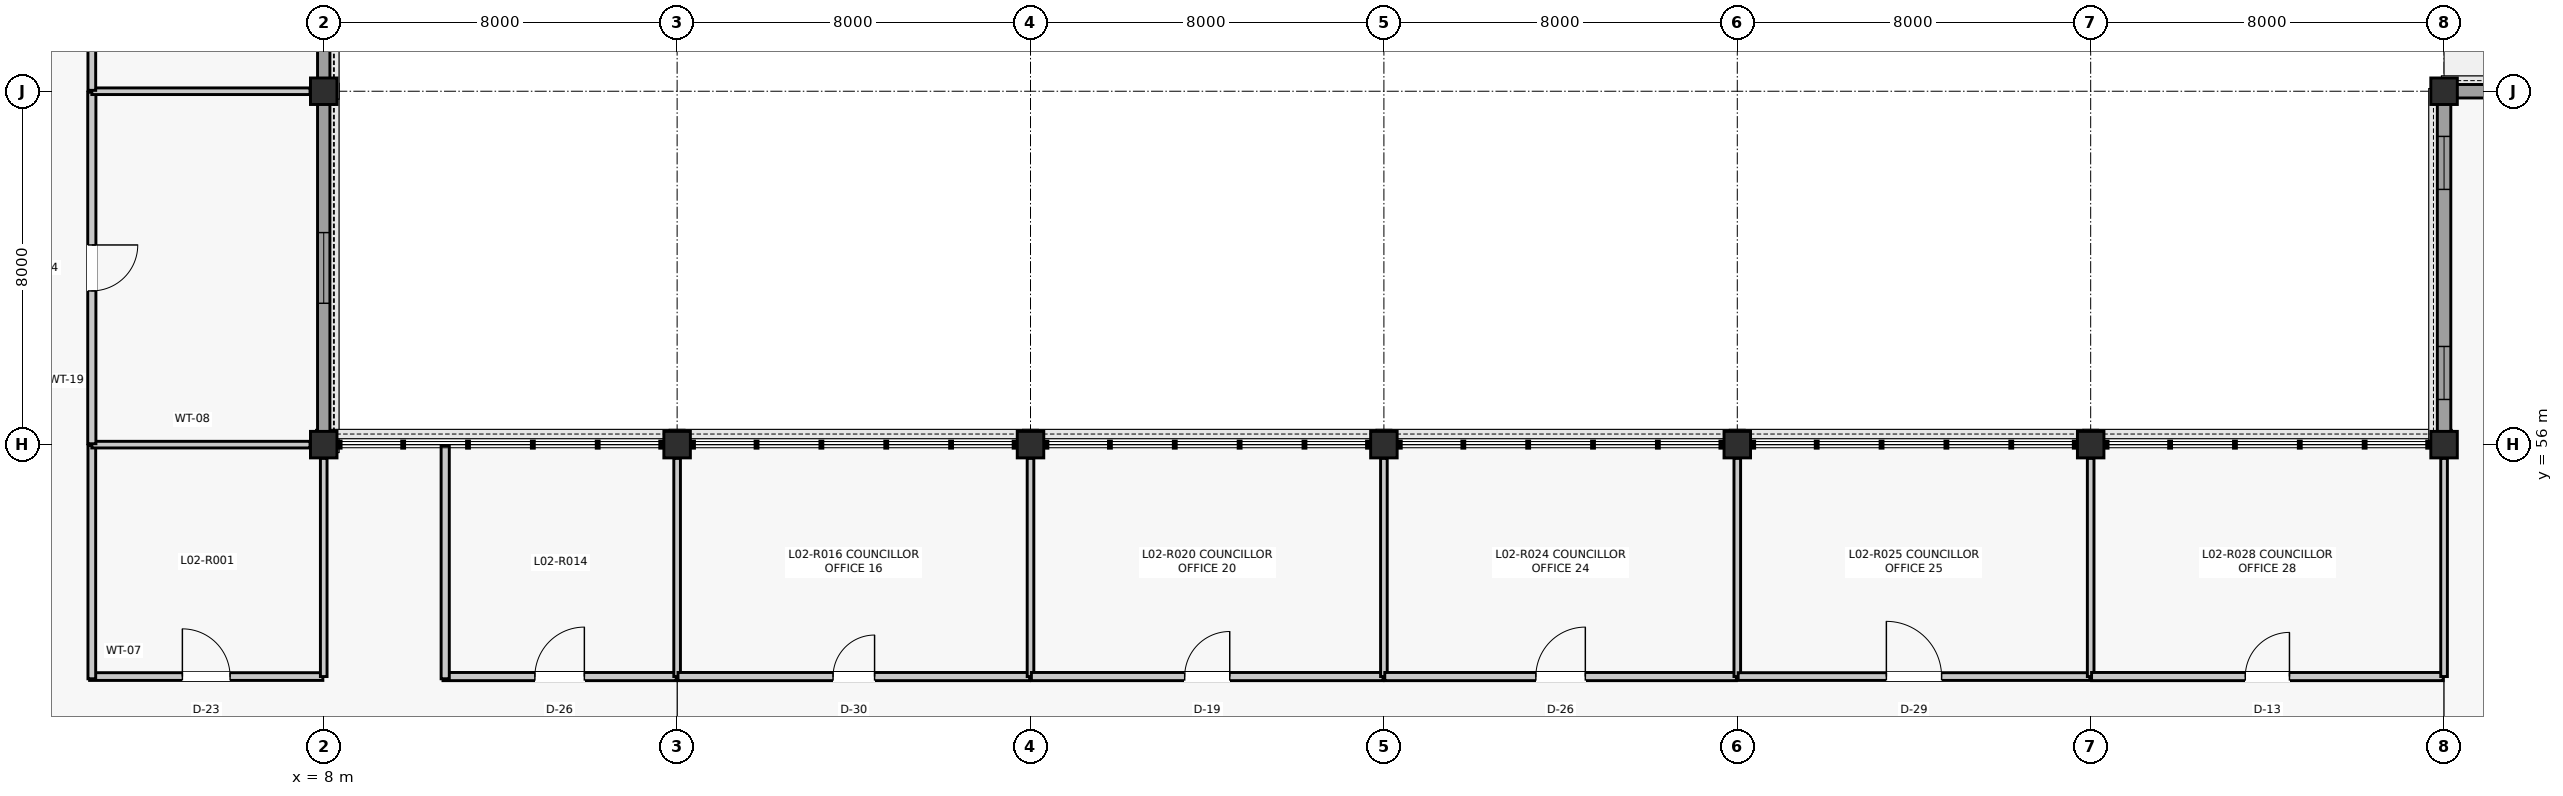
"""IFC4 building model, lengths in metres.
Left out: names, types, materials, properties, quantities, classifications, styles, units other than length and angle.
Written with IfcOpenShell. Run it as: python <this file> out.ifc"""

import sys

from ifc_helpers import new_model, si_unit, direction, frame, frame_2d, origin, origin_2d, place, context, subcontext, project, spatial, rectangle, extrude, element, fill, save


model = new_model("IFC4")
c1 = context("Model", 3, precision=1e-05, world=origin(), true_north=direction((0.0, 1.0)))
c2 = subcontext(c1, "Body", "Model", "MODEL_VIEW")
j1 = project(units=[si_unit("LENGTHUNIT", "METRE"), si_unit("PLANEANGLEUNIT", "RADIAN")], contexts=[c1])
p1 = place(None, origin())
s1 = spatial("IfcSite", under=j1, at=p1, CompositionType="ELEMENT")
p2 = place(p1, origin())
s2 = spatial("IfcBuilding", under=s1, at=p2, CompositionType="ELEMENT")
p3 = place(p2, frame((0.0, 0.0, 9.9)))
s3 = spatial("IfcBuildingStorey", under=s2, at=p3, CompositionType="ELEMENT", Elevation=9.9)
for number, where, z_axis, x_axis in (
    (1, (8.0, 56.0, 0.0), (0.0, 0.0, 1.0), (1.0, 0.0, 0.0)),
    (2, (8.0, 64.0, 0.0), (0.0, 0.0, 1.0), (1.0, 0.0, 0.0)),
    (3, (16.0, 56.0, 0.0), (0.0, 0.0, 1.0), (1.0, 0.0, 0.0)),
    (4, (24.0, 56.0, 0.0), (0.0, 0.0, 1.0), (1.0, 0.0, 0.0)),
    (5, (32.0, 56.0, 0.0), (0.0, 0.0, 1.0), (1.0, 0.0, 0.0)),
    (6, (40.0, 56.0, 0.0), (0.0, 0.0, 1.0), (1.0, 0.0, 0.0)),
    (7, (48.0, 56.0, 0.0), (0.0, 0.0, 1.0), (1.0, 0.0, 0.0)),
    (8, (56.0, 56.0, 0.0), (0.0, 0.0, 1.0), (1.0, 0.0, 0.0)),
    (9, (56.0, 64.0, 0.0), (0.0, 0.0, 1.0), (1.0, 0.0, 0.0)),
):
    element("IfcColumn", number, at=place(p3, frame(where, z_axis=z_axis, x_axis=x_axis)), inside=s3, PredefinedType="COLUMN", context=c2, shape_type="SweptSolid", body=[
        extrude(rectangle(XDim=0.6, YDim=0.6, at=origin_2d()), origin(), (0.0, 0.0, 1.0), 3.96),
    ])
p4 = place(p3, frame((8.0, 56.285, 0.0), z_axis=(0.0, 0.0, 1.0), x_axis=(0.0, 1.0, 0.0)))
e10 = element("IfcWall", 10, at=p4, inside=s3, PredefinedType="SOLIDWALL", context=c2, shape_type="SweptSolid", body=[
    extrude(rectangle(XDim=7.43, YDim=0.28, at=frame_2d((3.715, 0.0))), origin(), (0.0, 0.0, 1.0), 3.284),
])
p5 = place(p4, frame((2.915, 0.0, 0.9)))
e11 = element("IfcOpeningElement", 11, at=p5, cuts=e10, PredefinedType="OPENING", context=c2, shape_type="SweptSolid", body=[
    extrude(rectangle(XDim=1.6, YDim=2.0, at=frame_2d((0.8, 1.0))), frame((0.0, 0.15, 0.0), z_axis=(0.0, -1.0, 0.0), x_axis=(1.0, 0.0, 0.0)), (0.0, 0.0, 1.0), 0.3),
])
p6 = place(p3, frame((8.0, 64.285, 0.0), z_axis=(0.0, 0.0, 1.0), x_axis=(0.0, 1.0, 0.0)))
e12 = element("IfcWall", 12, at=p6, inside=s3, PredefinedType="SOLIDWALL", context=c2, shape_type="SweptSolid", body=[
    extrude(rectangle(XDim=7.43, YDim=0.28, at=frame_2d((3.715, 0.0))), origin(), (0.0, 0.0, 1.0), 3.347),
])
p7 = place(p6, frame((2.965, 0.0, 0.9)))
e13 = element("IfcOpeningElement", 13, at=p7, cuts=e12, PredefinedType="OPENING", context=c2, shape_type="SweptSolid", body=[
    extrude(rectangle(XDim=1.5, YDim=1.9, at=frame_2d((0.75, 0.95))), frame((0.0, 0.15, 0.0), z_axis=(0.0, -1.0, 0.0), x_axis=(1.0, 0.0, 0.0)), (0.0, 0.0, 1.0), 0.3),
])
p8 = place(p3, frame((56.285, 64.0, 0.0), z_axis=(0.0, 0.0, 1.0), x_axis=(1.0, 0.0, 0.0)))
e14 = element("IfcWall", 14, at=p8, inside=s3, PredefinedType="SOLIDWALL", context=c2, shape_type="SweptSolid", body=[
    extrude(rectangle(XDim=7.43, YDim=0.305, at=frame_2d((3.715, 0.0))), origin(), (0.0, 0.0, 1.0), 3.344),
])
p9 = place(p8, frame((0.737, 0.0, 0.95)))
e15 = element("IfcOpeningElement", 15, at=p9, cuts=e14, PredefinedType="OPENING", context=c2, shape_type="SweptSolid", body=[
    extrude(rectangle(XDim=1.2, YDim=1.8, at=frame_2d((0.6, 0.9))), frame((0.0, 0.162, 0.0), z_axis=(0.0, -1.0, 0.0), x_axis=(1.0, 0.0, 0.0)), (0.0, 0.0, 1.0), 0.325),
])
p10 = place(p8, frame((5.493, 0.0, 0.95)))
e16 = element("IfcOpeningElement", 16, at=p10, cuts=e14, PredefinedType="OPENING", context=c2, shape_type="SweptSolid", body=[
    extrude(rectangle(XDim=1.2, YDim=1.8, at=frame_2d((0.6, 0.9))), frame((0.0, 0.162, 0.0), z_axis=(0.0, -1.0, 0.0), x_axis=(1.0, 0.0, 0.0)), (0.0, 0.0, 1.0), 0.325),
])
p11 = place(p3, frame((56.0, 56.285, 0.0), z_axis=(0.0, 0.0, 1.0), x_axis=(0.0, 1.0, 0.0)))
e17 = element("IfcWall", 17, at=p11, inside=s3, PredefinedType="SOLIDWALL", context=c2, shape_type="SweptSolid", body=[
    extrude(rectangle(XDim=7.43, YDim=0.305, at=frame_2d((3.715, 0.0))), origin(), (0.0, 0.0, 1.0), 3.28),
])
p12 = place(p11, frame((0.737, 0.0, 0.95)))
e18 = element("IfcOpeningElement", 18, at=p12, cuts=e17, PredefinedType="OPENING", context=c2, shape_type="SweptSolid", body=[
    extrude(rectangle(XDim=1.2, YDim=1.8, at=frame_2d((0.6, 0.9))), frame((0.0, 0.162, 0.0), z_axis=(0.0, -1.0, 0.0), x_axis=(1.0, 0.0, 0.0)), (0.0, 0.0, 1.0), 0.325),
])
p13 = place(p11, frame((5.493, 0.0, 0.95)))
e19 = element("IfcOpeningElement", 19, at=p13, cuts=e17, PredefinedType="OPENING", context=c2, shape_type="SweptSolid", body=[
    extrude(rectangle(XDim=1.2, YDim=1.8, at=frame_2d((0.6, 0.9))), frame((0.0, 0.162, 0.0), z_axis=(0.0, -1.0, 0.0), x_axis=(1.0, 0.0, 0.0)), (0.0, 0.0, 1.0), 0.325),
])
p14 = place(p3, frame((2.7, 50.75, 0.0), z_axis=(0.0, 0.0, 1.0), x_axis=(1.0, 0.0, 0.0)))
e20 = element("IfcWall", 20, at=p14, inside=s3, PredefinedType="PARTITIONING", context=c2, shape_type="SweptSolid", body=[
    extrude(rectangle(XDim=5.28, YDim=0.175, at=frame_2d((2.64, 0.0))), origin(), (0.0, 0.0, 1.0), 3.221),
])
p15 = place(p14, frame((2.1, 0.0, 0.0)))
e21 = element("IfcOpeningElement", 21, at=p15, cuts=e20, PredefinedType="OPENING", context=c2, shape_type="SweptSolid", body=[
    extrude(rectangle(XDim=1.08, YDim=2.2, at=frame_2d((0.54, 1.1))), frame((0.0, 0.097, 0.0), z_axis=(0.0, -1.0, 0.0), x_axis=(1.0, 0.0, 0.0)), (0.0, 0.0, 1.0), 0.195),
])
p16 = place(p3, frame((2.75, 50.7, 0.0), z_axis=(0.0, 0.0, 1.0), x_axis=(0.0, 1.0, 0.0)))
e22 = element("IfcWall", 22, at=p16, inside=s3, PredefinedType="PARTITIONING", context=c2, shape_type="SweptSolid", body=[
    extrude(rectangle(XDim=5.28, YDim=0.175, at=frame_2d((2.64, 0.0))), origin(), (0.0, 0.0, 1.0), 3.151),
])
p17 = place(p3, frame((2.75, 56.0, 0.0), z_axis=(0.0, 0.0, 1.0), x_axis=(1.0, 0.0, 0.0)))
e23 = element("IfcWall", 23, at=p17, inside=s3, PredefinedType="PARTITIONING", context=c2, shape_type="SweptSolid", body=[
    extrude(rectangle(XDim=4.94, YDim=0.15, at=frame_2d((2.47, 0.0))), origin(), (0.0, 0.0, 1.0), 3.151),
])
p18 = place(p3, frame((8.0, 50.75, 0.0), z_axis=(0.0, 0.0, 1.0), x_axis=(0.0, 1.0, 0.0)))
e24 = element("IfcWall", 24, at=p18, inside=s3, PredefinedType="PARTITIONING", context=c2, shape_type="SweptSolid", body=[
    extrude(rectangle(XDim=4.94, YDim=0.15, at=frame_2d((2.47, 0.0))), origin(), (0.0, 0.0, 1.0), 3.221),
])
p19 = place(p3, frame((2.75, 56.02, 0.0), z_axis=(0.0, 0.0, 1.0), x_axis=(0.0, 1.0, 0.0)))
e25 = element("IfcWall", 25, at=p19, inside=s3, PredefinedType="PARTITIONING", context=c2, shape_type="SweptSolid", body=[
    extrude(rectangle(XDim=7.96, YDim=0.185, at=frame_2d((3.98, 0.0))), origin(), (0.0, 0.0, 1.0), 3.082),
])
p20 = place(p19, frame((3.46, 0.0, 0.0)))
e26 = element("IfcOpeningElement", 26, at=p20, cuts=e25, PredefinedType="OPENING", context=c2, shape_type="SweptSolid", body=[
    extrude(rectangle(XDim=1.04, YDim=2.18, at=frame_2d((0.52, 1.09))), frame((0.0, 0.103, 0.0), z_axis=(0.0, -1.0, 0.0), x_axis=(1.0, 0.0, 0.0)), (0.0, 0.0, 1.0), 0.205),
])
p21 = place(p3, frame((2.75, 64.0, 0.0), z_axis=(0.0, 0.0, 1.0), x_axis=(1.0, 0.0, 0.0)))
e27 = element("IfcWall", 27, at=p21, inside=s3, PredefinedType="PARTITIONING", context=c2, shape_type="SweptSolid", body=[
    extrude(rectangle(XDim=4.94, YDim=0.15, at=frame_2d((2.47, 0.0))), origin(), (0.0, 0.0, 1.0), 3.082),
])
p22 = place(p3, frame((2.75, 64.02, 0.0), z_axis=(0.0, 0.0, 1.0), x_axis=(0.0, 1.0, 0.0)))
e28 = element("IfcWall", 28, at=p22, inside=s3, PredefinedType="PARTITIONING", context=c2, shape_type="SweptSolid", body=[
    extrude(rectangle(XDim=7.96, YDim=0.175, at=frame_2d((3.98, 0.0))), origin(), (0.0, 0.0, 1.0), 3.082),
])
p23 = place(p22, frame((3.5, 0.0, 0.0)))
e29 = element("IfcOpeningElement", 29, at=p23, cuts=e28, PredefinedType="OPENING", context=c2, shape_type="SweptSolid", body=[
    extrude(rectangle(XDim=0.96, YDim=2.14, at=frame_2d((0.48, 1.07))), frame((0.0, 0.097, 0.0), z_axis=(0.0, -1.0, 0.0), x_axis=(1.0, 0.0, 0.0)), (0.0, 0.0, 1.0), 0.195),
])
p24 = place(p3, frame((10.7, 50.75, 0.0), z_axis=(0.0, 0.0, 1.0), x_axis=(1.0, 0.0, 0.0)))
e30 = element("IfcWall", 30, at=p24, inside=s3, PredefinedType="PARTITIONING", context=c2, shape_type="SweptSolid", body=[
    extrude(rectangle(XDim=5.28, YDim=0.185, at=frame_2d((2.64, 0.0))), origin(), (0.0, 0.0, 1.0), 3.157),
])
p25 = place(p24, frame((2.08, 0.0, 0.0)))
e31 = element("IfcOpeningElement", 31, at=p25, cuts=e30, PredefinedType="OPENING", context=c2, shape_type="SweptSolid", body=[
    extrude(rectangle(XDim=1.12, YDim=2.22, at=frame_2d((0.56, 1.11))), frame((0.0, 0.103, 0.0), z_axis=(0.0, -1.0, 0.0), x_axis=(1.0, 0.0, 0.0)), (0.0, 0.0, 1.0), 0.205),
])
p26 = place(p3, frame((10.75, 50.7, 0.0), z_axis=(0.0, 0.0, 1.0), x_axis=(0.0, 1.0, 0.0)))
e32 = element("IfcWall", 32, at=p26, inside=s3, PredefinedType="PARTITIONING", context=c2, shape_type="SweptSolid", body=[
    extrude(rectangle(XDim=5.28, YDim=0.185, at=frame_2d((2.64, 0.0))), origin(), (0.0, 0.0, 1.0), 3.277),
])
p27 = place(p3, frame((16.0, 50.75, 0.0), z_axis=(0.0, 0.0, 1.0), x_axis=(0.0, 1.0, 0.0)))
e33 = element("IfcWall", 33, at=p27, inside=s3, PredefinedType="PARTITIONING", context=c2, shape_type="SweptSolid", body=[
    extrude(rectangle(XDim=4.94, YDim=0.15, at=frame_2d((2.47, 0.0))), origin(), (0.0, 0.0, 1.0), 3.157),
])
p28 = place(p3, frame((16.02, 50.75, 0.0), z_axis=(0.0, 0.0, 1.0), x_axis=(1.0, 0.0, 0.0)))
e34 = element("IfcWall", 34, at=p28, inside=s3, PredefinedType="PARTITIONING", context=c2, shape_type="SweptSolid", body=[
    extrude(rectangle(XDim=7.96, YDim=0.185, at=frame_2d((3.98, 0.0))), origin(), (0.0, 0.0, 1.0), 3.157),
])
p29 = place(p28, frame((3.51, 0.0, 0.0)))
e35 = element("IfcOpeningElement", 35, at=p29, cuts=e34, PredefinedType="OPENING", context=c2, shape_type="SweptSolid", body=[
    extrude(rectangle(XDim=0.94, YDim=2.12, at=frame_2d((0.47, 1.06))), frame((0.0, 0.103, 0.0), z_axis=(0.0, -1.0, 0.0), x_axis=(1.0, 0.0, 0.0)), (0.0, 0.0, 1.0), 0.205),
])
p30 = place(p3, frame((24.0, 50.75, 0.0), z_axis=(0.0, 0.0, 1.0), x_axis=(0.0, 1.0, 0.0)))
e36 = element("IfcWall", 36, at=p30, inside=s3, PredefinedType="PARTITIONING", context=c2, shape_type="SweptSolid", body=[
    extrude(rectangle(XDim=4.94, YDim=0.15, at=frame_2d((2.47, 0.0))), origin(), (0.0, 0.0, 1.0), 3.227),
])
p31 = place(p3, frame((24.02, 50.75, 0.0), z_axis=(0.0, 0.0, 1.0), x_axis=(1.0, 0.0, 0.0)))
e37 = element("IfcWall", 37, at=p31, inside=s3, PredefinedType="PARTITIONING", context=c2, shape_type="SweptSolid", body=[
    extrude(rectangle(XDim=7.96, YDim=0.185, at=frame_2d((3.98, 0.0))), origin(), (0.0, 0.0, 1.0), 3.151),
])
p32 = place(p31, frame((3.47, 0.0, 0.0)))
e38 = element("IfcOpeningElement", 38, at=p32, cuts=e37, PredefinedType="OPENING", context=c2, shape_type="SweptSolid", body=[
    extrude(rectangle(XDim=1.02, YDim=2.2, at=frame_2d((0.51, 1.1))), frame((0.0, 0.103, 0.0), z_axis=(0.0, -1.0, 0.0), x_axis=(1.0, 0.0, 0.0)), (0.0, 0.0, 1.0), 0.205),
])
p33 = place(p3, frame((32.0, 50.75, 0.0), z_axis=(0.0, 0.0, 1.0), x_axis=(0.0, 1.0, 0.0)))
e39 = element("IfcWall", 39, at=p33, inside=s3, PredefinedType="PARTITIONING", context=c2, shape_type="SweptSolid", body=[
    extrude(rectangle(XDim=4.94, YDim=0.15, at=frame_2d((2.47, 0.0))), origin(), (0.0, 0.0, 1.0), 3.151),
])
p34 = place(p3, frame((32.02, 50.75, 0.0), z_axis=(0.0, 0.0, 1.0), x_axis=(1.0, 0.0, 0.0)))
e40 = element("IfcWall", 40, at=p34, inside=s3, PredefinedType="PARTITIONING", context=c2, shape_type="SweptSolid", body=[
    extrude(rectangle(XDim=7.96, YDim=0.185, at=frame_2d((3.98, 0.0))), origin(), (0.0, 0.0, 1.0), 3.151),
])
p35 = place(p34, frame((3.42, 0.0, 0.0)))
e41 = element("IfcOpeningElement", 41, at=p35, cuts=e40, PredefinedType="OPENING", context=c2, shape_type="SweptSolid", body=[
    extrude(rectangle(XDim=1.12, YDim=2.22, at=frame_2d((0.56, 1.11))), frame((0.0, 0.103, 0.0), z_axis=(0.0, -1.0, 0.0), x_axis=(1.0, 0.0, 0.0)), (0.0, 0.0, 1.0), 0.205),
])
p36 = place(p3, frame((40.0, 50.75, 0.0), z_axis=(0.0, 0.0, 1.0), x_axis=(0.0, 1.0, 0.0)))
e42 = element("IfcWall", 42, at=p36, inside=s3, PredefinedType="PARTITIONING", context=c2, shape_type="SweptSolid", body=[
    extrude(rectangle(XDim=4.94, YDim=0.15, at=frame_2d((2.47, 0.0))), origin(), (0.0, 0.0, 1.0), 3.221),
])
p37 = place(p3, frame((40.02, 50.75, 0.0), z_axis=(0.0, 0.0, 1.0), x_axis=(1.0, 0.0, 0.0)))
e43 = element("IfcWall", 43, at=p37, inside=s3, PredefinedType="PARTITIONING", context=c2, shape_type="SweptSolid", body=[
    extrude(rectangle(XDim=7.96, YDim=0.175, at=frame_2d((3.98, 0.0))), origin(), (0.0, 0.0, 1.0), 3.157),
])
p38 = place(p37, frame((3.355, 0.0, 0.0)))
e44 = element("IfcOpeningElement", 44, at=p38, cuts=e43, PredefinedType="OPENING", context=c2, shape_type="SweptSolid", body=[
    extrude(rectangle(XDim=1.25, YDim=2.18, at=frame_2d((0.625, 1.09))), frame((0.0, 0.097, 0.0), z_axis=(0.0, -1.0, 0.0), x_axis=(1.0, 0.0, 0.0)), (0.0, 0.0, 1.0), 0.195),
])
p39 = place(p3, frame((48.0, 50.75, 0.0), z_axis=(0.0, 0.0, 1.0), x_axis=(0.0, 1.0, 0.0)))
e45 = element("IfcWall", 45, at=p39, inside=s3, PredefinedType="PARTITIONING", context=c2, shape_type="SweptSolid", body=[
    extrude(rectangle(XDim=4.94, YDim=0.15, at=frame_2d((2.47, 0.0))), origin(), (0.0, 0.0, 1.0), 3.157),
])
p40 = place(p3, frame((48.02, 50.75, 0.0), z_axis=(0.0, 0.0, 1.0), x_axis=(1.0, 0.0, 0.0)))
e46 = element("IfcWall", 46, at=p40, inside=s3, PredefinedType="PARTITIONING", context=c2, shape_type="SweptSolid", body=[
    extrude(rectangle(XDim=7.96, YDim=0.185, at=frame_2d((3.98, 0.0))), origin(), (0.0, 0.0, 1.0), 3.157),
])
p41 = place(p40, frame((3.48, 0.0, 0.0)))
e47 = element("IfcOpeningElement", 47, at=p41, cuts=e46, PredefinedType="OPENING", context=c2, shape_type="SweptSolid", body=[
    extrude(rectangle(XDim=1.0, YDim=2.15, at=frame_2d((0.5, 1.075))), frame((0.0, 0.103, 0.0), z_axis=(0.0, -1.0, 0.0), x_axis=(1.0, 0.0, 0.0)), (0.0, 0.0, 1.0), 0.205),
])
p42 = place(p3, frame((56.0, 50.75, 0.0), z_axis=(0.0, 0.0, 1.0), x_axis=(0.0, 1.0, 0.0)))
e48 = element("IfcWall", 48, at=p42, inside=s3, PredefinedType="PARTITIONING", context=c2, shape_type="SweptSolid", body=[
    extrude(rectangle(XDim=4.94, YDim=0.15, at=frame_2d((2.47, 0.0))), origin(), (0.0, 0.0, 1.0), 3.227),
])
p43 = place(p5, origin())
e49 = element("IfcWindow", 49, at=p43, inside=s3, PartitioningType="SINGLE_PANEL", PredefinedType="WINDOW", context=c2, shape_type="SweptSolid", body=[
    extrude(rectangle(XDim=1.6, YDim=2.0, at=frame_2d((0.8, 1.0))), frame((0.0, 0.03, 0.0), z_axis=(0.0, -1.0, 0.0), x_axis=(1.0, 0.0, 0.0)), (0.0, 0.0, 1.0), 0.06),
])
fill(e11, e49)
p44 = place(p12, origin())
e50 = element("IfcWindow", 50, at=p44, inside=s3, PartitioningType="SINGLE_PANEL", PredefinedType="WINDOW", context=c2, shape_type="SweptSolid", body=[
    extrude(rectangle(XDim=1.2, YDim=1.8, at=frame_2d((0.6, 0.9))), frame((0.0, 0.03, 0.0), z_axis=(0.0, -1.0, 0.0), x_axis=(1.0, 0.0, 0.0)), (0.0, 0.0, 1.0), 0.06),
])
fill(e18, e50)
p45 = place(p13, origin())
e51 = element("IfcWindow", 51, at=p45, inside=s3, PartitioningType="SINGLE_PANEL", PredefinedType="WINDOW", context=c2, shape_type="SweptSolid", body=[
    extrude(rectangle(XDim=1.2, YDim=1.8, at=frame_2d((0.6, 0.9))), frame((0.0, 0.03, 0.0), z_axis=(0.0, -1.0, 0.0), x_axis=(1.0, 0.0, 0.0)), (0.0, 0.0, 1.0), 0.06),
])
fill(e19, e51)
p46 = place(p15, origin())
e52 = element("IfcDoor", 52, at=p46, inside=s3, OperationType="SINGLE_SWING_LEFT", PredefinedType="DOOR", context=c2, shape_type="SweptSolid", body=[
    extrude(rectangle(XDim=1.08, YDim=2.2, at=frame_2d((0.54, 1.1))), frame((0.0, 0.025, 0.0), z_axis=(0.0, -1.0, 0.0), x_axis=(1.0, 0.0, 0.0)), (0.0, 0.0, 1.0), 0.05),
])
fill(e21, e52)
p47 = place(p20, frame((1.04, 0.0, 0.0), z_axis=(0.0, 0.0, 1.0), x_axis=(-1.0, 0.0, 0.0)))
e53 = element("IfcDoor", 53, at=p47, inside=s3, OperationType="SINGLE_SWING_RIGHT", PredefinedType="DOOR", context=c2, shape_type="SweptSolid", body=[
    extrude(rectangle(XDim=1.04, YDim=2.18, at=frame_2d((0.52, 1.09))), frame((0.0, 0.025, 0.0), z_axis=(0.0, -1.0, 0.0), x_axis=(1.0, 0.0, 0.0)), (0.0, 0.0, 1.0), 0.05),
])
fill(e26, e53)
p48 = place(p25, origin())
e54 = element("IfcDoor", 54, at=p48, inside=s3, OperationType="SINGLE_SWING_RIGHT", PredefinedType="DOOR", context=c2, shape_type="SweptSolid", body=[
    extrude(rectangle(XDim=1.12, YDim=2.22, at=frame_2d((0.56, 1.11))), frame((0.0, 0.025, 0.0), z_axis=(0.0, -1.0, 0.0), x_axis=(1.0, 0.0, 0.0)), (0.0, 0.0, 1.0), 0.05),
])
fill(e31, e54)
p49 = place(p29, origin())
e55 = element("IfcDoor", 55, at=p49, inside=s3, OperationType="SINGLE_SWING_RIGHT", PredefinedType="DOOR", context=c2, shape_type="SweptSolid", body=[
    extrude(rectangle(XDim=0.94, YDim=2.12, at=frame_2d((0.47, 1.06))), frame((0.0, 0.025, 0.0), z_axis=(0.0, -1.0, 0.0), x_axis=(1.0, 0.0, 0.0)), (0.0, 0.0, 1.0), 0.05),
])
fill(e35, e55)
p50 = place(p32, origin())
e56 = element("IfcDoor", 56, at=p50, inside=s3, OperationType="SINGLE_SWING_RIGHT", PredefinedType="DOOR", context=c2, shape_type="SweptSolid", body=[
    extrude(rectangle(XDim=1.02, YDim=2.2, at=frame_2d((0.51, 1.1))), frame((0.0, 0.025, 0.0), z_axis=(0.0, -1.0, 0.0), x_axis=(1.0, 0.0, 0.0)), (0.0, 0.0, 1.0), 0.05),
])
fill(e38, e56)
p51 = place(p35, origin())
e57 = element("IfcDoor", 57, at=p51, inside=s3, OperationType="SINGLE_SWING_RIGHT", PredefinedType="DOOR", context=c2, shape_type="SweptSolid", body=[
    extrude(rectangle(XDim=1.12, YDim=2.22, at=frame_2d((0.56, 1.11))), frame((0.0, 0.025, 0.0), z_axis=(0.0, -1.0, 0.0), x_axis=(1.0, 0.0, 0.0)), (0.0, 0.0, 1.0), 0.05),
])
fill(e41, e57)
p52 = place(p38, origin())
e58 = element("IfcDoor", 58, at=p52, inside=s3, OperationType="SINGLE_SWING_LEFT", PredefinedType="DOOR", context=c2, shape_type="SweptSolid", body=[
    extrude(rectangle(XDim=1.25, YDim=2.18, at=frame_2d((0.625, 1.09))), frame((0.0, 0.025, 0.0), z_axis=(0.0, -1.0, 0.0), x_axis=(1.0, 0.0, 0.0)), (0.0, 0.0, 1.0), 0.05),
])
fill(e44, e58)
p53 = place(p41, origin())
e59 = element("IfcDoor", 59, at=p53, inside=s3, OperationType="SINGLE_SWING_RIGHT", PredefinedType="DOOR", context=c2, shape_type="SweptSolid", body=[
    extrude(rectangle(XDim=1.0, YDim=2.15, at=frame_2d((0.5, 1.075))), frame((0.0, 0.025, 0.0), z_axis=(0.0, -1.0, 0.0), x_axis=(1.0, 0.0, 0.0)), (0.0, 0.0, 1.0), 0.05),
])
fill(e47, e59)
save(model, sys.argv[1])
